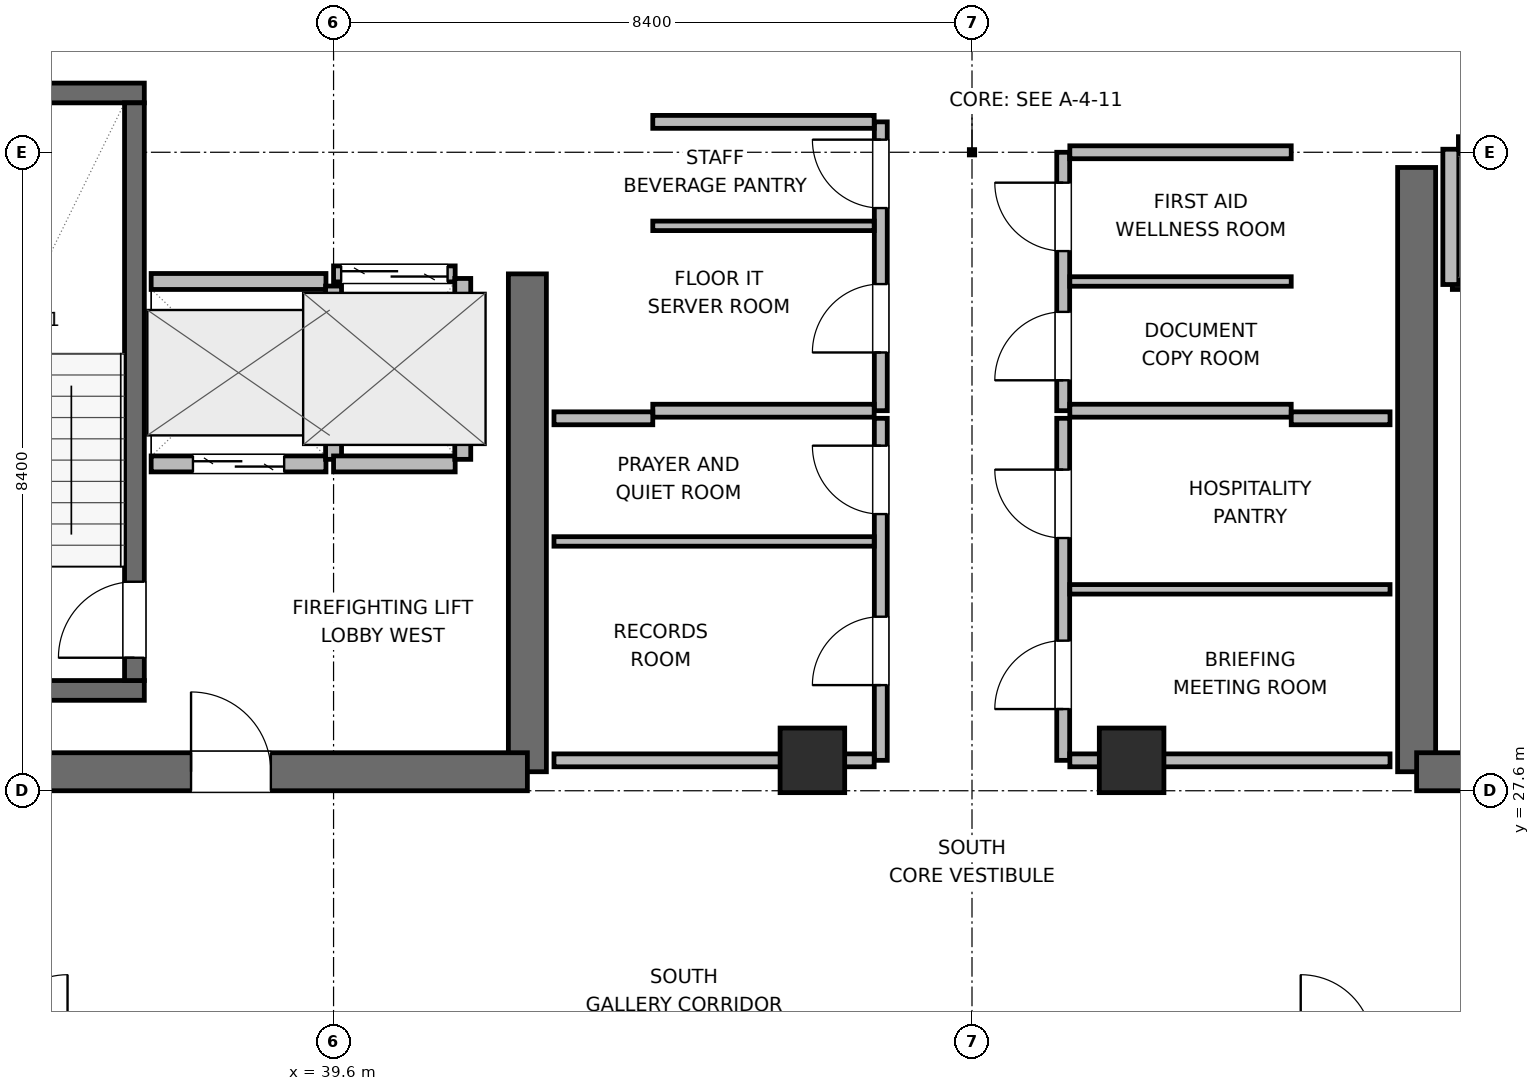
"""IFC4 building model, lengths in metres.
Left out: names, types, materials, properties, quantities, classifications, styles, units other than length and angle.
Written with IfcOpenShell. Run it as: python <this file> out.ifc"""

import sys

from ifc_helpers import new_model, si_unit, direction, frame, frame_2d, origin, origin_2d, place, context, subcontext, project, spatial, rectangle, extrude, element, fill, save


model = new_model("IFC4")
c1 = context("Model", 3, precision=1e-05, world=origin(), true_north=direction((0.0, 1.0)))
c2 = subcontext(c1, "Body", "Model", "MODEL_VIEW")
j1 = project(units=[si_unit("LENGTHUNIT", "METRE"), si_unit("PLANEANGLEUNIT", "RADIAN")], contexts=[c1])
p1 = place(None, origin())
s1 = spatial("IfcSite", under=j1, at=p1, CompositionType="ELEMENT")
p2 = place(p1, origin())
s2 = spatial("IfcBuilding", under=s1, at=p2, CompositionType="ELEMENT")
p3 = place(p2, frame((0.0, 0.0, 286.2)))
s3 = spatial("IfcBuildingStorey", under=s2, at=p3, CompositionType="ELEMENT", Elevation=286.2)
p4 = place(p3, frame((42.15, 27.85, 0.0), z_axis=(0.0, 0.0, 1.0), x_axis=(0.0, 1.0, 0.0)))
e1 = element("IfcWall", 1, at=p4, inside=s3, PredefinedType="SHEAR", context=c2, shape_type="SweptSolid", body=[
    extrude(rectangle(XDim=6.55, YDim=0.5, at=frame_2d((3.275, 0.0))), origin(), (0.0, 0.0, 1.0), 3.9),
])
p5 = place(p3, frame((32.65, 27.85, 0.0), z_axis=(0.0, 0.0, 1.0), x_axis=(1.0, 0.0, 0.0)))
e2 = element("IfcWall", 2, at=p5, inside=s3, PredefinedType="SHEAR", context=c2, shape_type="SweptSolid", body=[
    extrude(rectangle(XDim=9.5, YDim=0.5, at=frame_2d((4.75, 0.0))), origin(), (0.0, 0.0, 1.0), 3.9),
])
p6 = place(p5, frame((5.075, 0.0, 0.0)))
e3 = element("IfcOpeningElement", 3, at=p6, cuts=e2, PredefinedType="OPENING", context=c2, shape_type="SweptSolid", body=[
    extrude(rectangle(XDim=1.05, YDim=2.04, at=frame_2d((0.525, 1.02))), frame((0.0, 0.26, 0.0), z_axis=(0.0, -1.0, 0.0), x_axis=(1.0, 0.0, 0.0)), (0.0, 0.0, 1.0), 0.52),
])
p7 = place(p3, frame((53.85, 27.85, 0.0), z_axis=(0.0, 0.0, 1.0), x_axis=(0.0, 1.0, 0.0)))
e4 = element("IfcWall", 4, at=p7, inside=s3, PredefinedType="SHEAR", context=c2, shape_type="SweptSolid", body=[
    extrude(rectangle(XDim=7.95, YDim=0.5, at=frame_2d((3.975, 0.0))), origin(), (0.0, 0.0, 1.0), 3.9),
])
p8 = place(p3, frame((53.85, 27.85, 0.0), z_axis=(0.0, 0.0, 1.0), x_axis=(1.0, 0.0, 0.0)))
e5 = element("IfcWall", 5, at=p8, inside=s3, PredefinedType="SHEAR", context=c2, shape_type="SweptSolid", body=[
    extrude(rectangle(XDim=9.5, YDim=0.5, at=frame_2d((4.75, 0.0))), origin(), (0.0, 0.0, 1.0), 3.9),
])
p9 = place(p8, frame((4.025, 0.0, 0.0)))
e6 = element("IfcOpeningElement", 6, at=p9, cuts=e5, PredefinedType="OPENING", context=c2, shape_type="SweptSolid", body=[
    extrude(rectangle(XDim=1.05, YDim=2.04, at=frame_2d((0.525, 1.02))), frame((0.0, 0.26, 0.0), z_axis=(0.0, -1.0, 0.0), x_axis=(1.0, 0.0, 0.0)), (0.0, 0.0, 1.0), 0.52),
])
for number, where, z_axis, x_axis in (
    (7, (32.9, 28.92, 0.0), (0.0, 0.0, 1.0), (1.0, 0.0, 0.0)),
    (8, (32.9, 36.78, 0.0), (0.0, 0.0, 1.0), (1.0, 0.0, 0.0)),
):
    element("IfcWall", number, at=place(p3, frame(where, z_axis=z_axis, x_axis=x_axis)), inside=s3, PredefinedType="SHEAR", context=c2, shape_type="SweptSolid", body=[
        extrude(rectangle(XDim=4.21, YDim=0.26, at=frame_2d((2.105, 0.0))), origin(), (0.0, 0.0, 1.0), 3.9),
    ])
p10 = place(p3, frame((36.98, 29.05, 0.0), z_axis=(0.0, 0.0, 1.0), x_axis=(0.0, 1.0, 0.0)))
e9 = element("IfcWall", 9, at=p10, inside=s3, PredefinedType="SHEAR", context=c2, shape_type="SweptSolid", body=[
    extrude(rectangle(XDim=7.6, YDim=0.26, at=frame_2d((3.8, 0.0))), origin(), (0.0, 0.0, 1.0), 3.9),
])
p11 = place(p10, frame((0.3, 0.0, 0.0)))
e10 = element("IfcOpeningElement", 10, at=p11, cuts=e9, PredefinedType="OPENING", context=c2, shape_type="SweptSolid", body=[
    extrude(rectangle(XDim=1.0, YDim=2.04, at=frame_2d((0.5, 1.02))), frame((0.0, 0.14, 0.0), z_axis=(0.0, -1.0, 0.0), x_axis=(1.0, 0.0, 0.0)), (0.0, 0.0, 1.0), 0.28),
])
for number, where, z_axis, x_axis in (
    (11, (45.9, 28.0, 0.0), (0.0, 0.0, 1.0), (1.0, 0.0, 0.0)),
    (12, (50.1, 28.0, 0.0), (0.0, 0.0, 1.0), (1.0, 0.0, 0.0)),
):
    element("IfcColumn", number, at=place(p3, frame(where, z_axis=z_axis, x_axis=x_axis)), inside=s3, PredefinedType="COLUMN", context=c2, shape_type="SweptSolid", body=[
        extrude(rectangle(XDim=0.85, YDim=0.85, at=origin_2d()), origin(), (0.0, 0.0, 1.0), 3.9),
    ])
p12 = place(p3, frame((37.2, 31.9, 0.0), z_axis=(0.0, 0.0, 1.0), x_axis=(1.0, 0.0, 0.0)))
e13 = element("IfcWall", 13, at=p12, inside=s3, PredefinedType="PARTITIONING", context=c2, shape_type="SweptSolid", body=[
    extrude(rectangle(XDim=2.3, YDim=0.21, at=frame_2d((1.15, 0.0))), origin(), (0.0, 0.0, 1.0), 3.68),
])
p13 = place(p12, frame((0.55, 0.0, 0.0)))
e14 = element("IfcOpeningElement", 14, at=p13, cuts=e13, PredefinedType="OPENING", context=c2, shape_type="SweptSolid", body=[
    extrude(rectangle(XDim=1.2, YDim=2.04, at=frame_2d((0.6, 1.02))), frame((0.0, 0.115, 0.0), z_axis=(0.0, -1.0, 0.0), x_axis=(1.0, 0.0, 0.0)), (0.0, 0.0, 1.0), 0.23),
])
p14 = place(p3, frame((37.2, 34.3, 0.0), z_axis=(0.0, 0.0, 1.0), x_axis=(1.0, 0.0, 0.0)))
e15 = element("IfcWall", 15, at=p14, inside=s3, PredefinedType="PARTITIONING", context=c2, shape_type="SweptSolid", body=[
    extrude(rectangle(XDim=2.3, YDim=0.21, at=frame_2d((1.15, 0.0))), origin(), (0.0, 0.0, 1.0), 3.68),
])
p15 = place(p3, frame((39.6, 31.96, 0.0), z_axis=(0.0, 0.0, 1.0), x_axis=(0.0, 1.0, 0.0)))
e16 = element("IfcWall", 16, at=p15, inside=s3, PredefinedType="PARTITIONING", context=c2, shape_type="SweptSolid", body=[
    extrude(rectangle(XDim=2.28, YDim=0.21, at=frame_2d((1.14, 0.0))), origin(), (0.0, 0.0, 1.0), 3.68),
])
p16 = place(p3, frame((54.32, 34.3, 0.0), z_axis=(0.0, 0.0, 1.0), x_axis=(1.0, 0.0, 0.0)))
e17 = element("IfcWall", 17, at=p16, inside=s3, PredefinedType="PARTITIONING", context=c2, shape_type="SweptSolid", body=[
    extrude(rectangle(XDim=3.48, YDim=0.21, at=frame_2d((1.74, 0.0))), origin(), (0.0, 0.0, 1.0), 3.68),
])
p17 = place(p3, frame((39.6, 34.4, 0.0), z_axis=(0.0, 0.0, 1.0), x_axis=(1.0, 0.0, 0.0)))
e18 = element("IfcWall", 18, at=p17, inside=s3, PredefinedType="PARTITIONING", context=c2, shape_type="SweptSolid", body=[
    extrude(rectangle(XDim=1.6, YDim=0.21, at=frame_2d((0.8, 0.0))), origin(), (0.0, 0.0, 1.0), 3.68),
])
p18 = place(p17, frame((0.1, 0.0, 0.0)))
e19 = element("IfcOpeningElement", 19, at=p18, cuts=e18, PredefinedType="OPENING", context=c2, shape_type="SweptSolid", body=[
    extrude(rectangle(XDim=1.4, YDim=2.06, at=frame_2d((0.7, 1.03))), frame((0.0, 0.115, 0.0), z_axis=(0.0, -1.0, 0.0), x_axis=(1.0, 0.0, 0.0)), (0.0, 0.0, 1.0), 0.23),
])
p19 = place(p3, frame((39.6, 31.9, 0.0), z_axis=(0.0, 0.0, 1.0), x_axis=(1.0, 0.0, 0.0)))
e20 = element("IfcWall", 20, at=p19, inside=s3, PredefinedType="PARTITIONING", context=c2, shape_type="SweptSolid", body=[
    extrude(rectangle(XDim=1.6, YDim=0.21, at=frame_2d((0.8, 0.0))), origin(), (0.0, 0.0, 1.0), 3.68),
])
p20 = place(p3, frame((41.3, 31.96, 0.0), z_axis=(0.0, 0.0, 1.0), x_axis=(0.0, 1.0, 0.0)))
e21 = element("IfcWall", 21, at=p20, inside=s3, PredefinedType="PARTITIONING", context=c2, shape_type="SweptSolid", body=[
    extrude(rectangle(XDim=2.38, YDim=0.21, at=frame_2d((1.19, 0.0))), origin(), (0.0, 0.0, 1.0), 3.68),
])
p21 = place(p3, frame((54.4, 36.1, 0.0), z_axis=(0.0, 0.0, 1.0), x_axis=(1.0, 0.0, 0.0)))
e22 = element("IfcWall", 22, at=p21, inside=s3, PredefinedType="PARTITIONING", context=c2, shape_type="SweptSolid", body=[
    extrude(rectangle(XDim=2.1, YDim=0.21, at=frame_2d((1.05, 0.0))), origin(), (0.0, 0.0, 1.0), 3.68),
])
p22 = place(p21, frame((0.5, 0.0, 0.0)))
e23 = element("IfcOpeningElement", 23, at=p22, cuts=e22, PredefinedType="OPENING", context=c2, shape_type="SweptSolid", body=[
    extrude(rectangle(XDim=1.1, YDim=2.04, at=frame_2d((0.55, 1.02))), frame((0.0, 0.115, 0.0), z_axis=(0.0, -1.0, 0.0), x_axis=(1.0, 0.0, 0.0)), (0.0, 0.0, 1.0), 0.23),
])
p23 = place(p3, frame((54.3, 34.26, 0.0), z_axis=(0.0, 0.0, 1.0), x_axis=(0.0, 1.0, 0.0)))
e24 = element("IfcWall", 24, at=p23, inside=s3, PredefinedType="PARTITIONING", context=c2, shape_type="SweptSolid", body=[
    extrude(rectangle(XDim=1.78, YDim=0.21, at=frame_2d((0.89, 0.0))), origin(), (0.0, 0.0, 1.0), 3.68),
])
p24 = place(p3, frame((46.8, 32.6, 0.0), z_axis=(0.0, 0.0, 1.0), x_axis=(0.0, 1.0, 0.0)))
e25 = element("IfcWall", 25, at=p24, inside=s3, PredefinedType="PARTITIONING", context=c2, shape_type="SweptSolid", body=[
    extrude(rectangle(XDim=3.8, YDim=0.17, at=frame_2d((1.9, 0.0))), origin(), (0.0, 0.0, 1.0), 3.68),
])
p25 = place(p24, frame((0.766, 0.0, 0.0)))
e26 = element("IfcOpeningElement", 26, at=p25, cuts=e25, PredefinedType="OPENING", context=c2, shape_type="SweptSolid", body=[
    extrude(rectangle(XDim=0.9, YDim=2.02, at=frame_2d((0.45, 1.01))), frame((0.0, 0.095, 0.0), z_axis=(0.0, -1.0, 0.0), x_axis=(1.0, 0.0, 0.0)), (0.0, 0.0, 1.0), 0.19),
])
p26 = place(p24, frame((2.666, 0.0, 0.0)))
e27 = element("IfcOpeningElement", 27, at=p26, cuts=e25, PredefinedType="OPENING", context=c2, shape_type="SweptSolid", body=[
    extrude(rectangle(XDim=0.9, YDim=2.02, at=frame_2d((0.45, 1.01))), frame((0.0, 0.095, 0.0), z_axis=(0.0, -1.0, 0.0), x_axis=(1.0, 0.0, 0.0)), (0.0, 0.0, 1.0), 0.19),
])
for number, where, z_axis, x_axis in (
    (28, (43.8, 32.6, 0.0), (0.0, 0.0, 1.0), (1.0, 0.0, 0.0)),
    (29, (43.8, 36.4, 0.0), (0.0, 0.0, 1.0), (1.0, 0.0, 0.0)),
):
    element("IfcWall", number, at=place(p3, frame(where, z_axis=z_axis, x_axis=x_axis)), inside=s3, PredefinedType="PARTITIONING", context=c2, shape_type="SweptSolid", body=[
        extrude(rectangle(XDim=2.913, YDim=0.17, at=frame_2d((1.457, 0.0))), origin(), (0.0, 0.0, 1.0), 3.68),
    ])
p27 = place(p3, frame((43.8, 35.032, 0.0), z_axis=(0.0, 0.0, 1.0), x_axis=(1.0, 0.0, 0.0)))
e30 = element("IfcWall", 30, at=p27, inside=s3, PredefinedType="PARTITIONING", context=c2, shape_type="SweptSolid", body=[
    extrude(rectangle(XDim=2.913, YDim=0.125, at=frame_2d((1.457, 0.0))), origin(), (0.0, 0.0, 1.0), 3.68),
])
p28 = place(p3, frame((49.2, 32.6, 0.0), z_axis=(0.0, 0.0, 1.0), x_axis=(0.0, 1.0, 0.0)))
e31 = element("IfcWall", 31, at=p28, inside=s3, PredefinedType="PARTITIONING", context=c2, shape_type="SweptSolid", body=[
    extrude(rectangle(XDim=3.4, YDim=0.17, at=frame_2d((1.7, 0.0))), origin(), (0.0, 0.0, 1.0), 3.68),
])
p29 = place(p28, frame((0.4, 0.0, 0.0)))
e32 = element("IfcOpeningElement", 32, at=p29, cuts=e31, PredefinedType="OPENING", context=c2, shape_type="SweptSolid", body=[
    extrude(rectangle(XDim=0.9, YDim=2.02, at=frame_2d((0.45, 1.01))), frame((0.0, 0.095, 0.0), z_axis=(0.0, -1.0, 0.0), x_axis=(1.0, 0.0, 0.0)), (0.0, 0.0, 1.0), 0.19),
])
p30 = place(p28, frame((2.1, 0.0, 0.0)))
e33 = element("IfcOpeningElement", 33, at=p30, cuts=e31, PredefinedType="OPENING", context=c2, shape_type="SweptSolid", body=[
    extrude(rectangle(XDim=0.9, YDim=2.02, at=frame_2d((0.45, 1.01))), frame((0.0, 0.095, 0.0), z_axis=(0.0, -1.0, 0.0), x_axis=(1.0, 0.0, 0.0)), (0.0, 0.0, 1.0), 0.19),
])
for number, where, z_axis, x_axis in (
    (34, (49.287, 32.6, 0.0), (0.0, 0.0, 1.0), (1.0, 0.0, 0.0)),
    (35, (49.287, 36.0, 0.0), (0.0, 0.0, 1.0), (1.0, 0.0, 0.0)),
):
    element("IfcWall", number, at=place(p3, frame(where, z_axis=z_axis, x_axis=x_axis)), inside=s3, PredefinedType="PARTITIONING", context=c2, shape_type="SweptSolid", body=[
        extrude(rectangle(XDim=2.913, YDim=0.17, at=frame_2d((1.457, 0.0))), origin(), (0.0, 0.0, 1.0), 3.68),
    ])
p31 = place(p3, frame((49.287, 34.3, 0.0), z_axis=(0.0, 0.0, 1.0), x_axis=(1.0, 0.0, 0.0)))
e36 = element("IfcWall", 36, at=p31, inside=s3, PredefinedType="PARTITIONING", context=c2, shape_type="SweptSolid", body=[
    extrude(rectangle(XDim=2.913, YDim=0.125, at=frame_2d((1.457, 0.0))), origin(), (0.0, 0.0, 1.0), 3.68),
])
p32 = place(p3, frame((46.8, 28.0, 0.0), z_axis=(0.0, 0.0, 1.0), x_axis=(0.0, 1.0, 0.0)))
e37 = element("IfcWall", 37, at=p32, inside=s3, PredefinedType="PARTITIONING", context=c2, shape_type="SweptSolid", body=[
    extrude(rectangle(XDim=4.5, YDim=0.17, at=frame_2d((2.25, 0.0))), origin(), (0.0, 0.0, 1.0), 3.68),
])
p33 = place(p32, frame((0.99, 0.0, 0.0)))
e38 = element("IfcOpeningElement", 38, at=p33, cuts=e37, PredefinedType="OPENING", context=c2, shape_type="SweptSolid", body=[
    extrude(rectangle(XDim=0.9, YDim=2.02, at=frame_2d((0.45, 1.01))), frame((0.0, 0.095, 0.0), z_axis=(0.0, -1.0, 0.0), x_axis=(1.0, 0.0, 0.0)), (0.0, 0.0, 1.0), 0.19),
])
p34 = place(p32, frame((3.24, 0.0, 0.0)))
e39 = element("IfcOpeningElement", 39, at=p34, cuts=e37, PredefinedType="OPENING", context=c2, shape_type="SweptSolid", body=[
    extrude(rectangle(XDim=0.9, YDim=2.02, at=frame_2d((0.45, 1.01))), frame((0.0, 0.095, 0.0), z_axis=(0.0, -1.0, 0.0), x_axis=(1.0, 0.0, 0.0)), (0.0, 0.0, 1.0), 0.19),
])
p35 = place(p3, frame((42.5, 28.0, 0.0), z_axis=(0.0, 0.0, 1.0), x_axis=(1.0, 0.0, 0.0)))
e40 = element("IfcWall", 40, at=p35, inside=s3, PredefinedType="PARTITIONING", context=c2, shape_type="SweptSolid", body=[
    extrude(rectangle(XDim=4.213, YDim=0.17, at=frame_2d((2.106, 0.0))), origin(), (0.0, 0.0, 1.0), 2.765),
])
p36 = place(p3, frame((42.5, 32.5, 0.0), z_axis=(0.0, 0.0, 1.0), x_axis=(1.0, 0.0, 0.0)))
e41 = element("IfcWall", 41, at=p36, inside=s3, PredefinedType="PARTITIONING", context=c2, shape_type="SweptSolid", body=[
    extrude(rectangle(XDim=1.3, YDim=0.17, at=frame_2d((0.65, 0.0))), origin(), (0.0, 0.0, 1.0), 3.68),
])
p37 = place(p3, frame((42.5, 30.88, 0.0), z_axis=(0.0, 0.0, 1.0), x_axis=(1.0, 0.0, 0.0)))
e42 = element("IfcWall", 42, at=p37, inside=s3, PredefinedType="PARTITIONING", context=c2, shape_type="SweptSolid", body=[
    extrude(rectangle(XDim=4.213, YDim=0.125, at=frame_2d((2.106, 0.0))), origin(), (0.0, 0.0, 1.0), 3.68),
])
p38 = place(p3, frame((49.2, 28.0, 0.0), z_axis=(0.0, 0.0, 1.0), x_axis=(0.0, 1.0, 0.0)))
e43 = element("IfcWall", 43, at=p38, inside=s3, PredefinedType="PARTITIONING", context=c2, shape_type="SweptSolid", body=[
    extrude(rectangle(XDim=4.5, YDim=0.17, at=frame_2d((2.25, 0.0))), origin(), (0.0, 0.0, 1.0), 3.68),
])
p39 = place(p38, frame((0.675, 0.0, 0.0)))
e44 = element("IfcOpeningElement", 44, at=p39, cuts=e43, PredefinedType="OPENING", context=c2, shape_type="SweptSolid", body=[
    extrude(rectangle(XDim=0.9, YDim=2.02, at=frame_2d((0.45, 1.01))), frame((0.0, 0.095, 0.0), z_axis=(0.0, -1.0, 0.0), x_axis=(1.0, 0.0, 0.0)), (0.0, 0.0, 1.0), 0.19),
])
p40 = place(p38, frame((2.925, 0.0, 0.0)))
e45 = element("IfcOpeningElement", 45, at=p40, cuts=e43, PredefinedType="OPENING", context=c2, shape_type="SweptSolid", body=[
    extrude(rectangle(XDim=0.9, YDim=2.02, at=frame_2d((0.45, 1.01))), frame((0.0, 0.095, 0.0), z_axis=(0.0, -1.0, 0.0), x_axis=(1.0, 0.0, 0.0)), (0.0, 0.0, 1.0), 0.19),
])
p41 = place(p3, frame((49.287, 28.0, 0.0), z_axis=(0.0, 0.0, 1.0), x_axis=(1.0, 0.0, 0.0)))
e46 = element("IfcWall", 46, at=p41, inside=s3, PredefinedType="PARTITIONING", context=c2, shape_type="SweptSolid", body=[
    extrude(rectangle(XDim=4.213, YDim=0.17, at=frame_2d((2.106, 0.0))), origin(), (0.0, 0.0, 1.0), 2.765),
])
p42 = place(p3, frame((52.2, 32.5, 0.0), z_axis=(0.0, 0.0, 1.0), x_axis=(1.0, 0.0, 0.0)))
e47 = element("IfcWall", 47, at=p42, inside=s3, PredefinedType="PARTITIONING", context=c2, shape_type="SweptSolid", body=[
    extrude(rectangle(XDim=1.3, YDim=0.17, at=frame_2d((0.65, 0.0))), origin(), (0.0, 0.0, 1.0), 3.68),
])
p43 = place(p3, frame((49.287, 30.25, 0.0), z_axis=(0.0, 0.0, 1.0), x_axis=(1.0, 0.0, 0.0)))
e48 = element("IfcWall", 48, at=p43, inside=s3, PredefinedType="PARTITIONING", context=c2, shape_type="SweptSolid", body=[
    extrude(rectangle(XDim=4.213, YDim=0.125, at=frame_2d((2.106, 0.0))), origin(), (0.0, 0.0, 1.0), 3.68),
])
p44 = place(p11, origin())
e49 = element("IfcDoor", 49, at=p44, inside=s3, OperationType="SINGLE_SWING_LEFT", PredefinedType="DOOR", context=c2, shape_type="SweptSolid", body=[
    extrude(rectangle(XDim=1.0, YDim=2.04, at=frame_2d((0.5, 1.02))), frame((0.0, 0.025, 0.0), z_axis=(0.0, -1.0, 0.0), x_axis=(1.0, 0.0, 0.0)), (0.0, 0.0, 1.0), 0.05),
])
fill(e10, e49)
p45 = place(p13, origin())
e50 = element("IfcDoor", 50, at=p45, inside=s3, OperationType="DOUBLE_DOOR_SLIDING", PredefinedType="DOOR", context=c2, shape_type="SweptSolid", body=[
    extrude(rectangle(XDim=1.2, YDim=2.04, at=frame_2d((0.6, 1.02))), frame((0.0, 0.025, 0.0), z_axis=(0.0, -1.0, 0.0), x_axis=(1.0, 0.0, 0.0)), (0.0, 0.0, 1.0), 0.05),
])
fill(e14, e50)
p46 = place(p18, origin())
e51 = element("IfcDoor", 51, at=p46, inside=s3, OperationType="DOUBLE_DOOR_SLIDING", PredefinedType="DOOR", context=c2, shape_type="SweptSolid", body=[
    extrude(rectangle(XDim=1.4, YDim=2.06, at=frame_2d((0.7, 1.03))), frame((0.0, 0.025, 0.0), z_axis=(0.0, -1.0, 0.0), x_axis=(1.0, 0.0, 0.0)), (0.0, 0.0, 1.0), 0.05),
])
fill(e19, e51)
p47 = place(p6, origin())
e52 = element("IfcDoor", 52, at=p47, inside=s3, OperationType="SINGLE_SWING_LEFT", PredefinedType="DOOR", context=c2, shape_type="SweptSolid", body=[
    extrude(rectangle(XDim=1.05, YDim=2.04, at=frame_2d((0.525, 1.02))), frame((0.0, 0.025, 0.0), z_axis=(0.0, -1.0, 0.0), x_axis=(1.0, 0.0, 0.0)), (0.0, 0.0, 1.0), 0.05),
])
fill(e3, e52)
p48 = place(p25, origin())
e53 = element("IfcDoor", 53, at=p48, inside=s3, OperationType="SINGLE_SWING_LEFT", PredefinedType="DOOR", context=c2, shape_type="SweptSolid", body=[
    extrude(rectangle(XDim=0.9, YDim=2.02, at=frame_2d((0.45, 1.01))), frame((0.0, 0.025, 0.0), z_axis=(0.0, -1.0, 0.0), x_axis=(1.0, 0.0, 0.0)), (0.0, 0.0, 1.0), 0.05),
])
fill(e26, e53)
p49 = place(p26, origin())
e54 = element("IfcDoor", 54, at=p49, inside=s3, OperationType="SINGLE_SWING_RIGHT", PredefinedType="DOOR", context=c2, shape_type="SweptSolid", body=[
    extrude(rectangle(XDim=0.9, YDim=2.02, at=frame_2d((0.45, 1.01))), frame((0.0, 0.025, 0.0), z_axis=(0.0, -1.0, 0.0), x_axis=(1.0, 0.0, 0.0)), (0.0, 0.0, 1.0), 0.05),
])
fill(e27, e54)
p50 = place(p29, origin())
e55 = element("IfcDoor", 55, at=p50, inside=s3, OperationType="SINGLE_SWING_LEFT", PredefinedType="DOOR", context=c2, shape_type="SweptSolid", body=[
    extrude(rectangle(XDim=0.9, YDim=2.02, at=frame_2d((0.45, 1.01))), frame((0.0, 0.025, 0.0), z_axis=(0.0, -1.0, 0.0), x_axis=(1.0, 0.0, 0.0)), (0.0, 0.0, 1.0), 0.05),
])
fill(e32, e55)
p51 = place(p30, origin())
e56 = element("IfcDoor", 56, at=p51, inside=s3, OperationType="SINGLE_SWING_RIGHT", PredefinedType="DOOR", context=c2, shape_type="SweptSolid", body=[
    extrude(rectangle(XDim=0.9, YDim=2.02, at=frame_2d((0.45, 1.01))), frame((0.0, 0.025, 0.0), z_axis=(0.0, -1.0, 0.0), x_axis=(1.0, 0.0, 0.0)), (0.0, 0.0, 1.0), 0.05),
])
fill(e33, e56)
p52 = place(p33, origin())
e57 = element("IfcDoor", 57, at=p52, inside=s3, OperationType="SINGLE_SWING_LEFT", PredefinedType="DOOR", context=c2, shape_type="SweptSolid", body=[
    extrude(rectangle(XDim=0.9, YDim=2.02, at=frame_2d((0.45, 1.01))), frame((0.0, 0.025, 0.0), z_axis=(0.0, -1.0, 0.0), x_axis=(1.0, 0.0, 0.0)), (0.0, 0.0, 1.0), 0.05),
])
fill(e38, e57)
p53 = place(p34, origin())
e58 = element("IfcDoor", 58, at=p53, inside=s3, OperationType="SINGLE_SWING_RIGHT", PredefinedType="DOOR", context=c2, shape_type="SweptSolid", body=[
    extrude(rectangle(XDim=0.9, YDim=2.02, at=frame_2d((0.45, 1.01))), frame((0.0, 0.025, 0.0), z_axis=(0.0, -1.0, 0.0), x_axis=(1.0, 0.0, 0.0)), (0.0, 0.0, 1.0), 0.05),
])
fill(e39, e58)
p54 = place(p39, origin())
e59 = element("IfcDoor", 59, at=p54, inside=s3, OperationType="SINGLE_SWING_LEFT", PredefinedType="DOOR", context=c2, shape_type="SweptSolid", body=[
    extrude(rectangle(XDim=0.9, YDim=2.02, at=frame_2d((0.45, 1.01))), frame((0.0, 0.025, 0.0), z_axis=(0.0, -1.0, 0.0), x_axis=(1.0, 0.0, 0.0)), (0.0, 0.0, 1.0), 0.05),
])
fill(e44, e59)
p55 = place(p40, origin())
e60 = element("IfcDoor", 60, at=p55, inside=s3, OperationType="SINGLE_SWING_RIGHT", PredefinedType="DOOR", context=c2, shape_type="SweptSolid", body=[
    extrude(rectangle(XDim=0.9, YDim=2.02, at=frame_2d((0.45, 1.01))), frame((0.0, 0.025, 0.0), z_axis=(0.0, -1.0, 0.0), x_axis=(1.0, 0.0, 0.0)), (0.0, 0.0, 1.0), 0.05),
])
fill(e45, e60)
save(model, sys.argv[1])
